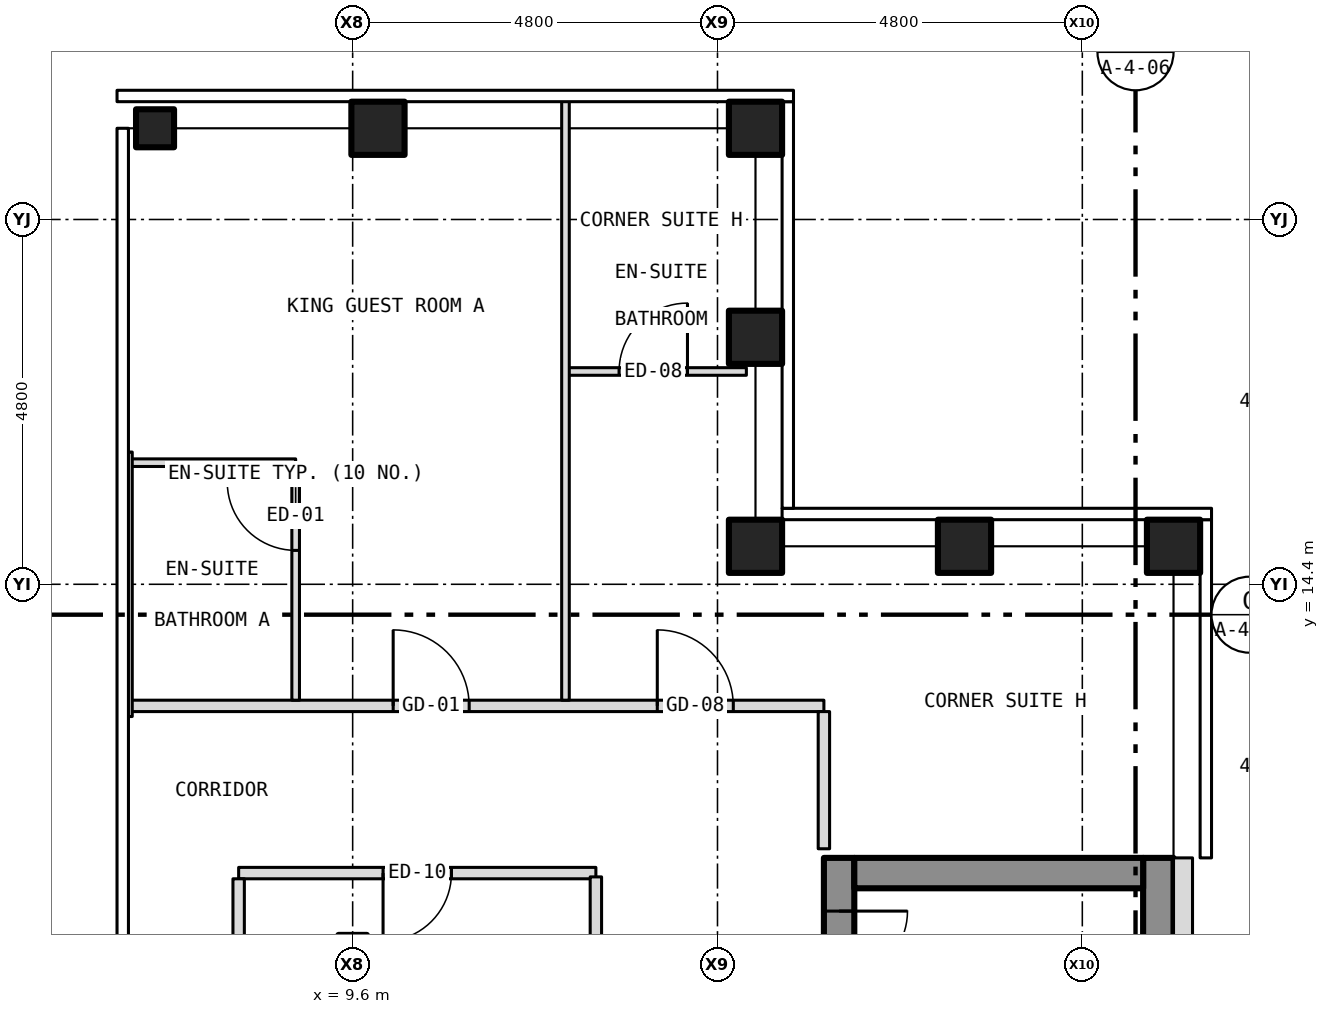
"""IFC4 building model, lengths in metres.
Left out: names, types, materials, properties, quantities, classifications, styles, units other than length and angle.
Written with IfcOpenShell. Run it as: python <this file> out.ifc"""

import sys

from ifc_helpers import new_model, si_unit, direction, frame, frame_2d, origin, origin_2d, place, context, subcontext, project, spatial, rectangle, hollow_rectangle, extrude, element, fill, save


model = new_model("IFC4")
c1 = context("Model", 3, precision=1e-05, world=origin(), true_north=direction((0.0, 1.0)))
c2 = subcontext(c1, "Body", "Model", "MODEL_VIEW")
j1 = project(units=[si_unit("LENGTHUNIT", "METRE"), si_unit("PLANEANGLEUNIT", "RADIAN")], contexts=[c1])
p1 = place(None, origin())
s1 = spatial("IfcSite", under=j1, at=p1, CompositionType="ELEMENT")
p2 = place(p1, origin())
s2 = spatial("IfcBuilding", under=s1, at=p2, CompositionType="ELEMENT")
p3 = place(p2, frame((0.0, 0.0, 226.0)))
s3 = spatial("IfcBuildingStorey", under=s2, at=p3, CompositionType="ELEMENT", Elevation=226.0)
for number, where, z_axis, x_axis in (
    (1, (9.933, 20.4, -0.15), (0.0, 0.0, 1.0), (1.0, 0.0, 0.0)),
    (2, (14.9, 20.4, -0.15), (0.0, 0.0, 1.0), (1.0, 0.0, 0.0)),
    (3, (20.4, 14.9, -0.15), (0.0, 0.0, 1.0), (1.0, 0.0, 0.0)),
    (4, (14.9, 14.9, -0.15), (0.0, 0.0, 1.0), (1.0, 0.0, 0.0)),
    (5, (14.9, 17.65, -0.15), (0.0, 0.0, 1.0), (1.0, 0.0, 0.0)),
    (6, (17.65, 14.9, -0.15), (0.0, 0.0, 1.0), (1.0, 0.0, 0.0)),
):
    element("IfcColumn", number, at=place(p3, frame(where, z_axis=z_axis, x_axis=x_axis)), inside=s3, PredefinedType="COLUMN", context=c2, shape_type="SweptSolid", body=[
        extrude(hollow_rectangle(XDim=0.7, YDim=0.7, WallThickness=0.04, at=origin_2d()), origin(), (0.0, 0.0, 1.0), 3.5),
    ])
p4 = place(p3, frame((7.0, 20.4, -0.15), z_axis=(0.0, 0.0, 1.0), x_axis=(1.0, 0.0, 0.0)))
e7 = element("IfcColumn", 7, at=p4, inside=s3, PredefinedType="COLUMN", context=c2, shape_type="SweptSolid", body=[
    extrude(hollow_rectangle(XDim=0.5, YDim=0.5, WallThickness=0.03, at=origin_2d()), origin(), (0.0, 0.0, 1.0), 3.5),
])
p5 = place(p3, frame((16.0, -10.8, 0.0), z_axis=(0.0, 0.0, 1.0), x_axis=(0.0, 1.0, 0.0)))
e8 = element("IfcWall", 8, at=p5, inside=s3, PredefinedType="SHEAR", context=c2, shape_type="SweptSolid", body=[
    extrude(rectangle(XDim=21.6, YDim=0.4, at=frame_2d((10.8, 0.0))), origin(), (0.0, 0.0, 1.0), 3.25),
])
p6 = place(p5, frame((9.4, 0.0, 0.0)))
e9 = element("IfcOpeningElement", 9, at=p6, cuts=e8, PredefinedType="OPENING", context=c2, shape_type="SweptSolid", body=[
    extrude(rectangle(XDim=1.1, YDim=2.1, at=frame_2d((0.55, 1.05))), frame((0.0, 0.212, 0.0), z_axis=(0.0, -1.0, 0.0), x_axis=(1.0, 0.0, 0.0)), (0.0, 0.0, 1.0), 0.424),
])
p7 = place(p5, frame((11.5, 0.0, 0.0)))
e10 = element("IfcOpeningElement", 10, at=p7, cuts=e8, PredefinedType="OPENING", context=c2, shape_type="SweptSolid", body=[
    extrude(rectangle(XDim=1.1, YDim=2.1, at=frame_2d((0.55, 1.05))), frame((0.0, 0.212, 0.0), z_axis=(0.0, -1.0, 0.0), x_axis=(1.0, 0.0, 0.0)), (0.0, 0.0, 1.0), 0.424),
])
p8 = place(p5, frame((13.6, 0.0, 0.0)))
e11 = element("IfcOpeningElement", 11, at=p8, cuts=e8, PredefinedType="OPENING", context=c2, shape_type="SweptSolid", body=[
    extrude(rectangle(XDim=1.1, YDim=2.1, at=frame_2d((0.55, 1.05))), frame((0.0, 0.212, 0.0), z_axis=(0.0, -1.0, 0.0), x_axis=(1.0, 0.0, 0.0)), (0.0, 0.0, 1.0), 0.424),
])
p9 = place(p5, frame((15.7, 0.0, 0.0)))
e12 = element("IfcOpeningElement", 12, at=p9, cuts=e8, PredefinedType="OPENING", context=c2, shape_type="SweptSolid", body=[
    extrude(rectangle(XDim=1.1, YDim=2.1, at=frame_2d((0.55, 1.05))), frame((0.0, 0.212, 0.0), z_axis=(0.0, -1.0, 0.0), x_axis=(1.0, 0.0, 0.0)), (0.0, 0.0, 1.0), 0.424),
])
p10 = place(p5, frame((17.8, 0.0, 0.0)))
e13 = element("IfcOpeningElement", 13, at=p10, cuts=e8, PredefinedType="OPENING", context=c2, shape_type="SweptSolid", body=[
    extrude(rectangle(XDim=1.1, YDim=2.1, at=frame_2d((0.55, 1.05))), frame((0.0, 0.212, 0.0), z_axis=(0.0, -1.0, 0.0), x_axis=(1.0, 0.0, 0.0)), (0.0, 0.0, 1.0), 0.424),
])
p11 = place(p5, frame((5.642, 0.0, 0.0)))
e14 = element("IfcOpeningElement", 14, at=p11, cuts=e8, PredefinedType="OPENING", context=c2, shape_type="SweptSolid", body=[
    extrude(rectangle(XDim=1.1, YDim=2.1, at=frame_2d((0.55, 1.05))), frame((0.0, 0.212, 0.0), z_axis=(0.0, -1.0, 0.0), x_axis=(1.0, 0.0, 0.0)), (0.0, 0.0, 1.0), 0.424),
])
p12 = place(p5, frame((7.5, 0.0, 0.0)))
e15 = element("IfcOpeningElement", 15, at=p12, cuts=e8, PredefinedType="OPENING", context=c2, shape_type="SweptSolid", body=[
    extrude(rectangle(XDim=1.1, YDim=2.1, at=frame_2d((0.55, 1.05))), frame((0.0, 0.212, 0.0), z_axis=(0.0, -1.0, 0.0), x_axis=(1.0, 0.0, 0.0)), (0.0, 0.0, 1.0), 0.424),
])
p13 = place(p5, frame((20.0, 0.0, 0.0)))
e16 = element("IfcOpeningElement", 16, at=p13, cuts=e8, PredefinedType="OPENING", context=c2, shape_type="SweptSolid", body=[
    extrude(rectangle(XDim=0.9, YDim=2.1, at=frame_2d((0.45, 1.05))), frame((0.0, 0.212, 0.0), z_axis=(0.0, -1.0, 0.0), x_axis=(1.0, 0.0, 0.0)), (0.0, 0.0, 1.0), 0.424),
])
p14 = place(p3, frame((20.2, -10.8, 0.0), z_axis=(0.0, 0.0, 1.0), x_axis=(0.0, 1.0, 0.0)))
e17 = element("IfcWall", 17, at=p14, inside=s3, PredefinedType="SHEAR", context=c2, shape_type="SweptSolid", body=[
    extrude(rectangle(XDim=21.6, YDim=0.4, at=frame_2d((10.8, 0.0))), origin(), (0.0, 0.0, 1.0), 3.25),
])
p15 = place(p3, frame((16.2, 10.6, 0.0), z_axis=(0.0, 0.0, 1.0), x_axis=(1.0, 0.0, 0.0)))
e18 = element("IfcWall", 18, at=p15, inside=s3, PredefinedType="SHEAR", context=c2, shape_type="SweptSolid", body=[
    extrude(rectangle(XDim=3.8, YDim=0.4, at=frame_2d((1.9, 0.0))), origin(), (0.0, 0.0, 1.0), 3.25),
])
p16 = place(p3, frame((20.525, -10.8, 0.0), z_axis=(0.0, 0.0, 1.0), x_axis=(0.0, 1.0, 0.0)))
e19 = element("IfcWall", 19, at=p16, inside=s3, PredefinedType="SOLIDWALL", context=c2, shape_type="SweptSolid", body=[
    extrude(rectangle(XDim=21.6, YDim=0.25, at=frame_2d((10.8, 0.0))), origin(), (0.0, 0.0, 1.0), 3.5),
])
p17 = place(p16, frame((2.95, 0.0, 1.0)))
e20 = element("IfcOpeningElement", 20, at=p17, cuts=e19, PredefinedType="OPENING", context=c2, shape_type="SweptSolid", body=[
    extrude(rectangle(XDim=0.6, YDim=1.5, at=frame_2d((0.3, 0.75))), frame((0.0, 0.137, 0.0), z_axis=(0.0, -1.0, 0.0), x_axis=(1.0, 0.0, 0.0)), (0.0, 0.0, 1.0), 0.274),
])
p18 = place(p3, frame((8.1, 10.6, 0.0), z_axis=(0.0, 0.0, 1.0), x_axis=(1.0, 0.0, 0.0)))
e21 = element("IfcWall", 21, at=p18, inside=s3, PredefinedType="PARTITIONING", context=c2, shape_type="SweptSolid", body=[
    extrude(rectangle(XDim=4.7, YDim=0.15, at=frame_2d((2.35, 0.0))), origin(), (0.0, 0.0, 1.0), 3.35),
])
p19 = place(p18, frame((1.9, 0.0, 0.0)))
e22 = element("IfcOpeningElement", 22, at=p19, cuts=e21, PredefinedType="OPENING", context=c2, shape_type="SweptSolid", body=[
    extrude(rectangle(XDim=0.9, YDim=2.1, at=frame_2d((0.45, 1.05))), frame((0.0, 0.087, 0.0), z_axis=(0.0, -1.0, 0.0), x_axis=(1.0, 0.0, 0.0)), (0.0, 0.0, 1.0), 0.174),
])
p20 = place(p3, frame((6.65, 12.8, 0.0), z_axis=(0.0, 0.0, 1.0), x_axis=(1.0, 0.0, 0.0)))
e23 = element("IfcWall", 23, at=p20, inside=s3, PredefinedType="PARTITIONING", context=c2, shape_type="SweptSolid", body=[
    extrude(rectangle(XDim=9.15, YDim=0.15, at=frame_2d((4.575, 0.0))), origin(), (0.0, 0.0, 1.0), 3.35),
])
p21 = place(p20, frame((3.483, 0.0, 0.0)))
e24 = element("IfcOpeningElement", 24, at=p21, cuts=e23, PredefinedType="OPENING", context=c2, shape_type="SweptSolid", body=[
    extrude(rectangle(XDim=1.0, YDim=2.1, at=frame_2d((0.5, 1.05))), frame((0.0, 0.087, 0.0), z_axis=(0.0, -1.0, 0.0), x_axis=(1.0, 0.0, 0.0)), (0.0, 0.0, 1.0), 0.174),
])
p22 = place(p20, frame((6.958, 0.0, 0.0)))
e25 = element("IfcOpeningElement", 25, at=p22, cuts=e23, PredefinedType="OPENING", context=c2, shape_type="SweptSolid", body=[
    extrude(rectangle(XDim=1.0, YDim=2.1, at=frame_2d((0.5, 1.05))), frame((0.0, 0.087, 0.0), z_axis=(0.0, -1.0, 0.0), x_axis=(1.0, 0.0, 0.0)), (0.0, 0.0, 1.0), 0.174),
])
p23 = place(p3, frame((6.65, 16.0, 0.0), z_axis=(0.0, 0.0, 1.0), x_axis=(1.0, 0.0, 0.0)))
e26 = element("IfcWall", 26, at=p23, inside=s3, PredefinedType="PARTITIONING", context=c2, shape_type="SweptSolid", body=[
    extrude(rectangle(XDim=2.2, YDim=0.1, at=frame_2d((1.1, 0.0))), origin(), (0.0, 0.0, 1.0), 3.35),
])
p24 = place(p3, frame((12.4, 17.2, 0.0), z_axis=(0.0, 0.0, 1.0), x_axis=(1.0, 0.0, 0.0)))
e27 = element("IfcWall", 27, at=p24, inside=s3, PredefinedType="PARTITIONING", context=c2, shape_type="SweptSolid", body=[
    extrude(rectangle(XDim=2.38, YDim=0.1, at=frame_2d((1.19, 0.0))), origin(), (0.0, 0.0, 1.0), 3.35),
])
p25 = place(p24, frame((0.705, 0.0, 0.0)))
e28 = element("IfcOpeningElement", 28, at=p25, cuts=e27, PredefinedType="OPENING", context=c2, shape_type="SweptSolid", body=[
    extrude(rectangle(XDim=0.9, YDim=2.1, at=frame_2d((0.45, 1.05))), frame((0.0, 0.062, 0.0), z_axis=(0.0, -1.0, 0.0), x_axis=(1.0, 0.0, 0.0)), (0.0, 0.0, 1.0), 0.124),
])
p26 = place(p3, frame((6.65, 12.66, 0.0), z_axis=(0.0, 0.0, 1.0), x_axis=(0.0, 1.0, 0.0)))
e29 = element("IfcWall", 29, at=p26, inside=s3, PredefinedType="PARTITIONING", context=c2, shape_type="SweptSolid", body=[
    extrude(rectangle(XDim=3.48, YDim=0.1, at=frame_2d((1.74, 0.0))), origin(), (0.0, 0.0, 1.0), 3.35),
])
p27 = place(p3, frame((8.1, 3.375, 0.0), z_axis=(0.0, 0.0, 1.0), x_axis=(0.0, 1.0, 0.0)))
e30 = element("IfcWall", 30, at=p27, inside=s3, PredefinedType="PARTITIONING", context=c2, shape_type="SweptSolid", body=[
    extrude(rectangle(XDim=7.15, YDim=0.15, at=frame_2d((3.575, 0.0))), origin(), (0.0, 0.0, 1.0), 3.35),
])
p28 = place(p3, frame((8.85, 12.875, 0.0), z_axis=(0.0, 0.0, 1.0), x_axis=(0.0, 1.0, 0.0)))
e31 = element("IfcWall", 31, at=p28, inside=s3, PredefinedType="PARTITIONING", context=c2, shape_type="SweptSolid", body=[
    extrude(rectangle(XDim=3.075, YDim=0.1, at=frame_2d((1.538, 0.0))), origin(), (0.0, 0.0, 1.0), 3.35),
])
p29 = place(p28, frame((1.971, 0.0, 0.0)))
e32 = element("IfcOpeningElement", 32, at=p29, cuts=e31, PredefinedType="OPENING", context=c2, shape_type="SweptSolid", body=[
    extrude(rectangle(XDim=0.9, YDim=2.1, at=frame_2d((0.45, 1.05))), frame((0.0, 0.062, 0.0), z_axis=(0.0, -1.0, 0.0), x_axis=(1.0, 0.0, 0.0)), (0.0, 0.0, 1.0), 0.124),
])
p30 = place(p3, frame((12.4, 12.875, 0.0), z_axis=(0.0, 0.0, 1.0), x_axis=(0.0, 1.0, 0.0)))
e33 = element("IfcWall", 33, at=p30, inside=s3, PredefinedType="PARTITIONING", context=c2, shape_type="SweptSolid", body=[
    extrude(rectangle(XDim=7.905, YDim=0.1, at=frame_2d((3.953, 0.0))), origin(), (0.0, 0.0, 1.0), 3.35),
])
p31 = place(p3, frame((12.8, 3.375, 0.0), z_axis=(0.0, 0.0, 1.0), x_axis=(0.0, 1.0, 0.0)))
e34 = element("IfcWall", 34, at=p31, inside=s3, PredefinedType="PARTITIONING", context=c2, shape_type="SweptSolid", body=[
    extrude(rectangle(XDim=7.175, YDim=0.15, at=frame_2d((3.587, 0.0))), origin(), (0.0, 0.0, 1.0), 3.35),
])
p32 = place(p3, frame((15.8, 10.92, 0.0), z_axis=(0.0, 0.0, 1.0), x_axis=(0.0, 1.0, 0.0)))
e35 = element("IfcWall", 35, at=p32, inside=s3, PredefinedType="PARTITIONING", context=c2, shape_type="SweptSolid", body=[
    extrude(rectangle(XDim=1.805, YDim=0.15, at=frame_2d((0.903, 0.0))), origin(), (0.0, 0.0, 1.0), 3.35),
])
p33 = place(p13, origin())
e36 = element("IfcDoor", 36, at=p33, inside=s3, OperationType="SINGLE_SWING_RIGHT", PredefinedType="DOOR", context=c2, shape_type="SweptSolid", body=[
    extrude(rectangle(XDim=0.9, YDim=2.1, at=frame_2d((0.45, 1.05))), frame((0.0, 0.025, 0.0), z_axis=(0.0, -1.0, 0.0), x_axis=(1.0, 0.0, 0.0)), (0.0, 0.0, 1.0), 0.05),
])
fill(e16, e36)
p34 = place(p21, origin())
e37 = element("IfcDoor", 37, at=p34, inside=s3, OperationType="SINGLE_SWING_LEFT", PredefinedType="DOOR", context=c2, shape_type="SweptSolid", body=[
    extrude(rectangle(XDim=1.0, YDim=2.1, at=frame_2d((0.5, 1.05))), frame((0.0, 0.025, 0.0), z_axis=(0.0, -1.0, 0.0), x_axis=(1.0, 0.0, 0.0)), (0.0, 0.0, 1.0), 0.05),
])
fill(e24, e37)
p35 = place(p29, origin())
e38 = element("IfcDoor", 38, at=p35, inside=s3, OperationType="SINGLE_SWING_RIGHT", PredefinedType="DOOR", context=c2, shape_type="SweptSolid", body=[
    extrude(rectangle(XDim=0.9, YDim=2.1, at=frame_2d((0.45, 1.05))), frame((0.0, 0.025, 0.0), z_axis=(0.0, -1.0, 0.0), x_axis=(1.0, 0.0, 0.0)), (0.0, 0.0, 1.0), 0.05),
])
fill(e32, e38)
p36 = place(p25, origin())
e39 = element("IfcDoor", 39, at=p36, inside=s3, OperationType="SINGLE_SWING_RIGHT", PredefinedType="DOOR", context=c2, shape_type="SweptSolid", body=[
    extrude(rectangle(XDim=0.9, YDim=2.1, at=frame_2d((0.45, 1.05))), frame((0.0, 0.025, 0.0), z_axis=(0.0, -1.0, 0.0), x_axis=(1.0, 0.0, 0.0)), (0.0, 0.0, 1.0), 0.05),
])
fill(e28, e39)
p37 = place(p22, origin())
e40 = element("IfcDoor", 40, at=p37, inside=s3, OperationType="SINGLE_SWING_LEFT", PredefinedType="DOOR", context=c2, shape_type="SweptSolid", body=[
    extrude(rectangle(XDim=1.0, YDim=2.1, at=frame_2d((0.5, 1.05))), frame((0.0, 0.025, 0.0), z_axis=(0.0, -1.0, 0.0), x_axis=(1.0, 0.0, 0.0)), (0.0, 0.0, 1.0), 0.05),
])
fill(e25, e40)
p38 = place(p19, origin())
e41 = element("IfcDoor", 41, at=p38, inside=s3, OperationType="SINGLE_SWING_LEFT", PredefinedType="DOOR", context=c2, shape_type="SweptSolid", body=[
    extrude(rectangle(XDim=0.9, YDim=2.1, at=frame_2d((0.45, 1.05))), frame((0.0, 0.025, 0.0), z_axis=(0.0, -1.0, 0.0), x_axis=(1.0, 0.0, 0.0)), (0.0, 0.0, 1.0), 0.05),
])
fill(e22, e41)
save(model, sys.argv[1])
